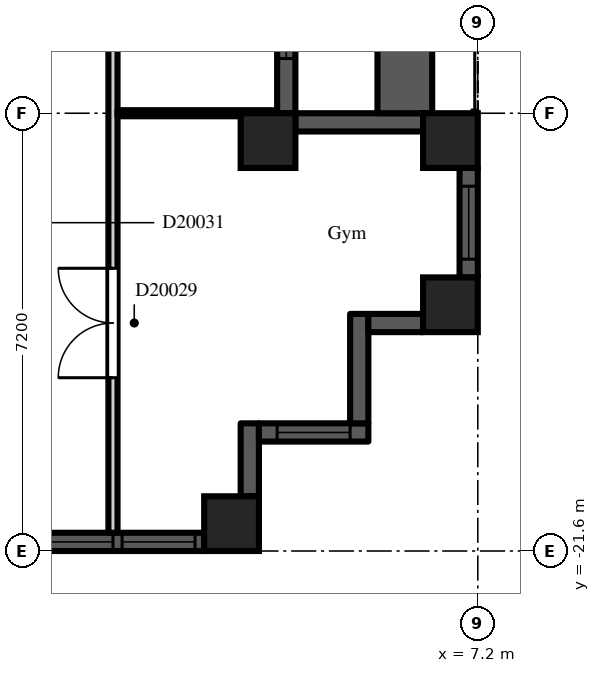
"""IFC4 building model, lengths in metres.
Left out: names, types, materials, properties, quantities, classifications, styles, units other than length and angle.
Written with IfcOpenShell. Run it as: python <this file> out.ifc"""

import sys

from ifc_helpers import new_model, si_unit, direction, frame, frame_2d, origin, origin_2d, place, context, subcontext, project, spatial, rectangle, extrude, element, fill, save


model = new_model("IFC4")
c1 = context("Model", 3, precision=1e-05, world=origin(), true_north=direction((0.0, 1.0)))
c2 = subcontext(c1, "Body", "Model", "MODEL_VIEW")
j1 = project(units=[si_unit("LENGTHUNIT", "METRE"), si_unit("PLANEANGLEUNIT", "RADIAN")], contexts=[c1])
p1 = place(None, origin())
s1 = spatial("IfcSite", under=j1, at=p1, CompositionType="ELEMENT")
p2 = place(p1, origin())
s2 = spatial("IfcBuilding", under=s1, at=p2, CompositionType="ELEMENT")
p3 = place(p2, frame((0.0, 0.0, 138.3)))
s3 = spatial("IfcBuildingStorey", under=s2, at=p3, CompositionType="ELEMENT", Elevation=138.3)
for number, where, z_axis, x_axis in (
    (1, (3.15, -21.15, 0.0), (0.0, 0.0, 1.0), (1.0, 0.0, 0.0)),
    (2, (3.75, -14.85, 0.0), (0.0, 0.0, 1.0), (1.0, 0.0, 0.0)),
    (3, (6.75, -17.55, 0.0), (0.0, 0.0, 1.0), (1.0, 0.0, 0.0)),
    (4, (6.75, -14.85, 0.0), (0.0, 0.0, 1.0), (1.0, 0.0, 0.0)),
):
    element("IfcColumn", number, at=place(p3, frame(where, z_axis=z_axis, x_axis=x_axis)), inside=s3, PredefinedType="COLUMN", context=c2, shape_type="SweptSolid", body=[
        extrude(rectangle(XDim=0.9, YDim=0.9, at=origin_2d()), origin(), (0.0, 0.0, 1.0), 3.0),
    ])
p4 = place(p3, frame((-2.7, -21.45, 0.0), z_axis=(0.0, 0.0, 1.0), x_axis=(1.0, 0.0, 0.0)))
e5 = element("IfcWall", 5, at=p4, inside=s3, PredefinedType="SOLIDWALL", context=c2, shape_type="SweptSolid", body=[
    extrude(rectangle(XDim=5.4, YDim=0.3, at=frame_2d((2.7, 0.0))), origin(), (0.0, 0.0, 1.0), 2.2),
])
p5 = place(p4, frame((1.5, 0.0, 0.2)))
e6 = element("IfcOpeningElement", 6, at=p5, cuts=e5, PredefinedType="OPENING", context=c2, shape_type="SweptSolid", body=[
    extrude(rectangle(XDim=2.4, YDim=1.85, at=frame_2d((1.2, 0.925))), frame((0.0, 0.16, 0.0), z_axis=(0.0, -1.0, 0.0), x_axis=(1.0, 0.0, 0.0)), (0.0, 0.0, 1.0), 0.32),
])
p6 = place(p4, frame((0.15, 0.0, 0.2)))
e7 = element("IfcOpeningElement", 7, at=p6, cuts=e5, PredefinedType="OPENING", context=c2, shape_type="SweptSolid", body=[
    extrude(rectangle(XDim=1.2, YDim=1.85, at=frame_2d((0.6, 0.925))), frame((0.0, 0.16, 0.0), z_axis=(0.0, -1.0, 0.0), x_axis=(1.0, 0.0, 0.0)), (0.0, 0.0, 1.0), 0.32),
])
p7 = place(p4, frame((4.05, 0.0, 0.2)))
e8 = element("IfcOpeningElement", 8, at=p7, cuts=e5, PredefinedType="OPENING", context=c2, shape_type="SweptSolid", body=[
    extrude(rectangle(XDim=1.2, YDim=1.85, at=frame_2d((0.6, 0.925))), frame((0.0, 0.16, 0.0), z_axis=(0.0, -1.0, 0.0), x_axis=(1.0, 0.0, 0.0)), (0.0, 0.0, 1.0), 0.32),
])
p8 = place(p3, frame((3.45, -20.7, 0.0), z_axis=(0.0, 0.0, 1.0), x_axis=(0.0, 1.0, 0.0)))
e9 = element("IfcWall", 9, at=p8, inside=s3, PredefinedType="SOLIDWALL", context=c2, shape_type="SweptSolid", body=[
    extrude(rectangle(XDim=1.2, YDim=0.3, at=frame_2d((0.6, 0.0))), origin(), (0.0, 0.0, 1.0), 2.6),
])
p9 = place(p3, frame((3.6, -19.65, 0.0), z_axis=(0.0, 0.0, 1.0), x_axis=(1.0, 0.0, 0.0)))
e10 = element("IfcWall", 10, at=p9, inside=s3, PredefinedType="SOLIDWALL", context=c2, shape_type="SweptSolid", body=[
    extrude(rectangle(XDim=1.8, YDim=0.3, at=frame_2d((0.9, 0.0))), origin(), (0.0, 0.0, 1.0), 2.6),
])
p10 = place(p9, frame((0.3, 0.0, 0.2)))
e11 = element("IfcOpeningElement", 11, at=p10, cuts=e10, PredefinedType="OPENING", context=c2, shape_type="SweptSolid", body=[
    extrude(rectangle(XDim=1.2, YDim=1.85, at=frame_2d((0.6, 0.925))), frame((0.0, 0.16, 0.0), z_axis=(0.0, -1.0, 0.0), x_axis=(1.0, 0.0, 0.0)), (0.0, 0.0, 1.0), 0.32),
])
p11 = place(p3, frame((5.25, -19.5, 0.0), z_axis=(0.0, 0.0, 1.0), x_axis=(0.0, 1.0, 0.0)))
e12 = element("IfcWall", 12, at=p11, inside=s3, PredefinedType="SOLIDWALL", context=c2, shape_type="SweptSolid", body=[
    extrude(rectangle(XDim=1.8, YDim=0.3, at=frame_2d((0.9, 0.0))), origin(), (0.0, 0.0, 1.0), 2.6),
])
p12 = place(p3, frame((5.4, -17.85, 0.0), z_axis=(0.0, 0.0, 1.0), x_axis=(1.0, 0.0, 0.0)))
e13 = element("IfcWall", 13, at=p12, inside=s3, PredefinedType="SOLIDWALL", context=c2, shape_type="SweptSolid", body=[
    extrude(rectangle(XDim=0.9, YDim=0.3, at=frame_2d((0.45, 0.0))), origin(), (0.0, 0.0, 1.0), 2.6),
])
p13 = place(p3, frame((7.05, -17.1, 0.0), z_axis=(0.0, 0.0, 1.0), x_axis=(0.0, 1.0, 0.0)))
e14 = element("IfcWall", 14, at=p13, inside=s3, PredefinedType="SOLIDWALL", context=c2, shape_type="SweptSolid", body=[
    extrude(rectangle(XDim=1.8, YDim=0.3, at=frame_2d((0.9, 0.0))), origin(), (0.0, 0.0, 1.0), 2.2),
])
p14 = place(p13, frame((0.3, 0.0, 0.2)))
e15 = element("IfcOpeningElement", 15, at=p14, cuts=e14, PredefinedType="OPENING", context=c2, shape_type="SweptSolid", body=[
    extrude(rectangle(XDim=1.2, YDim=1.85, at=frame_2d((0.6, 0.925))), frame((0.0, 0.16, 0.0), z_axis=(0.0, -1.0, 0.0), x_axis=(1.0, 0.0, 0.0)), (0.0, 0.0, 1.0), 0.32),
])
p15 = place(p3, frame((6.3, -14.55, 0.0), z_axis=(0.0, 0.0, 1.0), x_axis=(-1.0, 0.0, 0.0)))
e16 = element("IfcWall", 16, at=p15, inside=s3, PredefinedType="SOLIDWALL", context=c2, shape_type="SweptSolid", body=[
    extrude(rectangle(XDim=2.1, YDim=0.3, at=frame_2d((1.05, 0.0))), origin(), (0.0, 0.0, 1.0), 2.2),
])
p16 = place(p3, frame((4.05, -14.4, 0.0), z_axis=(0.0, 0.0, 1.0), x_axis=(0.0, 1.0, 0.0)))
e17 = element("IfcWall", 17, at=p16, inside=s3, PredefinedType="SOLIDWALL", context=c2, shape_type="SweptSolid", body=[
    extrude(rectangle(XDim=7.2, YDim=0.3, at=frame_2d((3.6, 0.0))), origin(), (0.0, 0.0, 1.0), 2.2),
])
p17 = place(p16, frame((3.0, 0.0, 0.0)))
e18 = element("IfcOpeningElement", 18, at=p17, cuts=e17, PredefinedType="OPENING", context=c2, shape_type="SweptSolid", body=[
    extrude(rectangle(XDim=1.2, YDim=2.05, at=frame_2d((0.6, 1.025))), frame((0.0, 0.16, 0.0), z_axis=(0.0, -1.0, 0.0), x_axis=(1.0, 0.0, 0.0)), (0.0, 0.0, 1.0), 0.32),
])
p18 = place(p16, frame((0.9, 0.0, 0.2)))
e19 = element("IfcOpeningElement", 19, at=p18, cuts=e17, PredefinedType="OPENING", context=c2, shape_type="SweptSolid", body=[
    extrude(rectangle(XDim=1.8, YDim=1.85, at=frame_2d((0.9, 0.925))), frame((0.0, 0.16, 0.0), z_axis=(0.0, -1.0, 0.0), x_axis=(1.0, 0.0, 0.0)), (0.0, 0.0, 1.0), 0.32),
])
p19 = place(p16, frame((4.5, 0.0, 0.2)))
e20 = element("IfcOpeningElement", 20, at=p19, cuts=e17, PredefinedType="OPENING", context=c2, shape_type="SweptSolid", body=[
    extrude(rectangle(XDim=1.8, YDim=1.85, at=frame_2d((0.9, 0.925))), frame((0.0, 0.16, 0.0), z_axis=(0.0, -1.0, 0.0), x_axis=(1.0, 0.0, 0.0)), (0.0, 0.0, 1.0), 0.32),
])
p20 = place(p3, frame((6.0, -14.4, 0.0), z_axis=(0.0, 0.0, 1.0), x_axis=(0.0, 1.0, 0.0)))
e21 = element("IfcWall", 21, at=p20, inside=s3, PredefinedType="PARAPET", context=c2, shape_type="SweptSolid", body=[
    extrude(rectangle(XDim=7.2, YDim=0.9, at=frame_2d((3.6, 0.0))), origin(), (0.0, 0.0, 1.0), 0.8),
])
p21 = place(p3, frame((1.2, -21.3, 0.0), z_axis=(0.0, 0.0, 1.0), x_axis=(0.0, 1.0, 0.0)))
e22 = element("IfcWall", 22, at=p21, inside=s3, PredefinedType="PARTITIONING", context=c2, shape_type="SweptSolid", body=[
    extrude(rectangle(XDim=14.175, YDim=0.15, at=frame_2d((7.087, 0.0))), origin(), (0.0, 0.0, 1.0), 2.6),
])
p22 = place(p21, frame((8.25, 0.0, 0.0)))
e23 = element("IfcOpeningElement", 23, at=p22, cuts=e22, PredefinedType="OPENING", context=c2, shape_type="SweptSolid", body=[
    extrude(rectangle(XDim=0.9, YDim=2.1, at=frame_2d((0.45, 1.05))), frame((0.0, 0.085, 0.0), z_axis=(0.0, -1.0, 0.0), x_axis=(1.0, 0.0, 0.0)), (0.0, 0.0, 1.0), 0.17),
])
p23 = place(p21, frame((2.55, 0.0, 0.0)))
e24 = element("IfcOpeningElement", 24, at=p23, cuts=e22, PredefinedType="OPENING", context=c2, shape_type="SweptSolid", body=[
    extrude(rectangle(XDim=1.8, YDim=2.1, at=frame_2d((0.9, 1.05))), frame((0.0, 0.085, 0.0), z_axis=(0.0, -1.0, 0.0), x_axis=(1.0, 0.0, 0.0)), (0.0, 0.0, 1.0), 0.17),
])
p24 = place(p3, frame((1.275, -14.4, 0.0), z_axis=(0.0, 0.0, 1.0), x_axis=(1.0, 0.0, 0.0)))
e25 = element("IfcWall", 25, at=p24, inside=s3, PredefinedType="PARTITIONING", context=c2, shape_type="SweptSolid", body=[
    extrude(rectangle(XDim=2.625, YDim=0.1, at=frame_2d((1.312, 0.0))), origin(), (0.0, 0.0, 1.0), 2.6),
])
p25 = place(p5, origin())
e26 = element("IfcWindow", 26, at=p25, inside=s3, PartitioningType="SINGLE_PANEL", PredefinedType="WINDOW", context=c2, shape_type="SweptSolid", body=[
    extrude(rectangle(XDim=2.4, YDim=1.85, at=frame_2d((1.2, 0.925))), frame((0.0, 0.03, 0.0), z_axis=(0.0, -1.0, 0.0), x_axis=(1.0, 0.0, 0.0)), (0.0, 0.0, 1.0), 0.06),
])
fill(e6, e26)
p26 = place(p7, origin())
e27 = element("IfcWindow", 27, at=p26, inside=s3, PartitioningType="SINGLE_PANEL", PredefinedType="WINDOW", context=c2, shape_type="SweptSolid", body=[
    extrude(rectangle(XDim=1.2, YDim=1.85, at=frame_2d((0.6, 0.925))), frame((0.0, 0.03, 0.0), z_axis=(0.0, -1.0, 0.0), x_axis=(1.0, 0.0, 0.0)), (0.0, 0.0, 1.0), 0.06),
])
fill(e8, e27)
p27 = place(p10, origin())
e28 = element("IfcWindow", 28, at=p27, inside=s3, PartitioningType="SINGLE_PANEL", PredefinedType="WINDOW", context=c2, shape_type="SweptSolid", body=[
    extrude(rectangle(XDim=1.2, YDim=1.85, at=frame_2d((0.6, 0.925))), frame((0.0, 0.03, 0.0), z_axis=(0.0, -1.0, 0.0), x_axis=(1.0, 0.0, 0.0)), (0.0, 0.0, 1.0), 0.06),
])
fill(e11, e28)
p28 = place(p14, origin())
e29 = element("IfcWindow", 29, at=p28, inside=s3, PartitioningType="SINGLE_PANEL", PredefinedType="WINDOW", context=c2, shape_type="SweptSolid", body=[
    extrude(rectangle(XDim=1.2, YDim=1.85, at=frame_2d((0.6, 0.925))), frame((0.0, 0.03, 0.0), z_axis=(0.0, -1.0, 0.0), x_axis=(1.0, 0.0, 0.0)), (0.0, 0.0, 1.0), 0.06),
])
fill(e15, e29)
p29 = place(p18, origin())
e30 = element("IfcWindow", 30, at=p29, inside=s3, PartitioningType="SINGLE_PANEL", PredefinedType="WINDOW", context=c2, shape_type="SweptSolid", body=[
    extrude(rectangle(XDim=1.8, YDim=1.85, at=frame_2d((0.9, 0.925))), frame((0.0, 0.03, 0.0), z_axis=(0.0, -1.0, 0.0), x_axis=(1.0, 0.0, 0.0)), (0.0, 0.0, 1.0), 0.06),
])
fill(e19, e30)
p30 = place(p23, origin())
e31 = element("IfcDoor", 31, at=p30, inside=s3, OperationType="DOUBLE_DOOR_DOUBLE_SWING", PredefinedType="DOOR", context=c2, shape_type="SweptSolid", body=[
    extrude(rectangle(XDim=1.8, YDim=2.1, at=frame_2d((0.9, 1.05))), frame((0.0, 0.025, 0.0), z_axis=(0.0, -1.0, 0.0), x_axis=(1.0, 0.0, 0.0)), (0.0, 0.0, 1.0), 0.05),
])
fill(e24, e31)
save(model, sys.argv[1])
